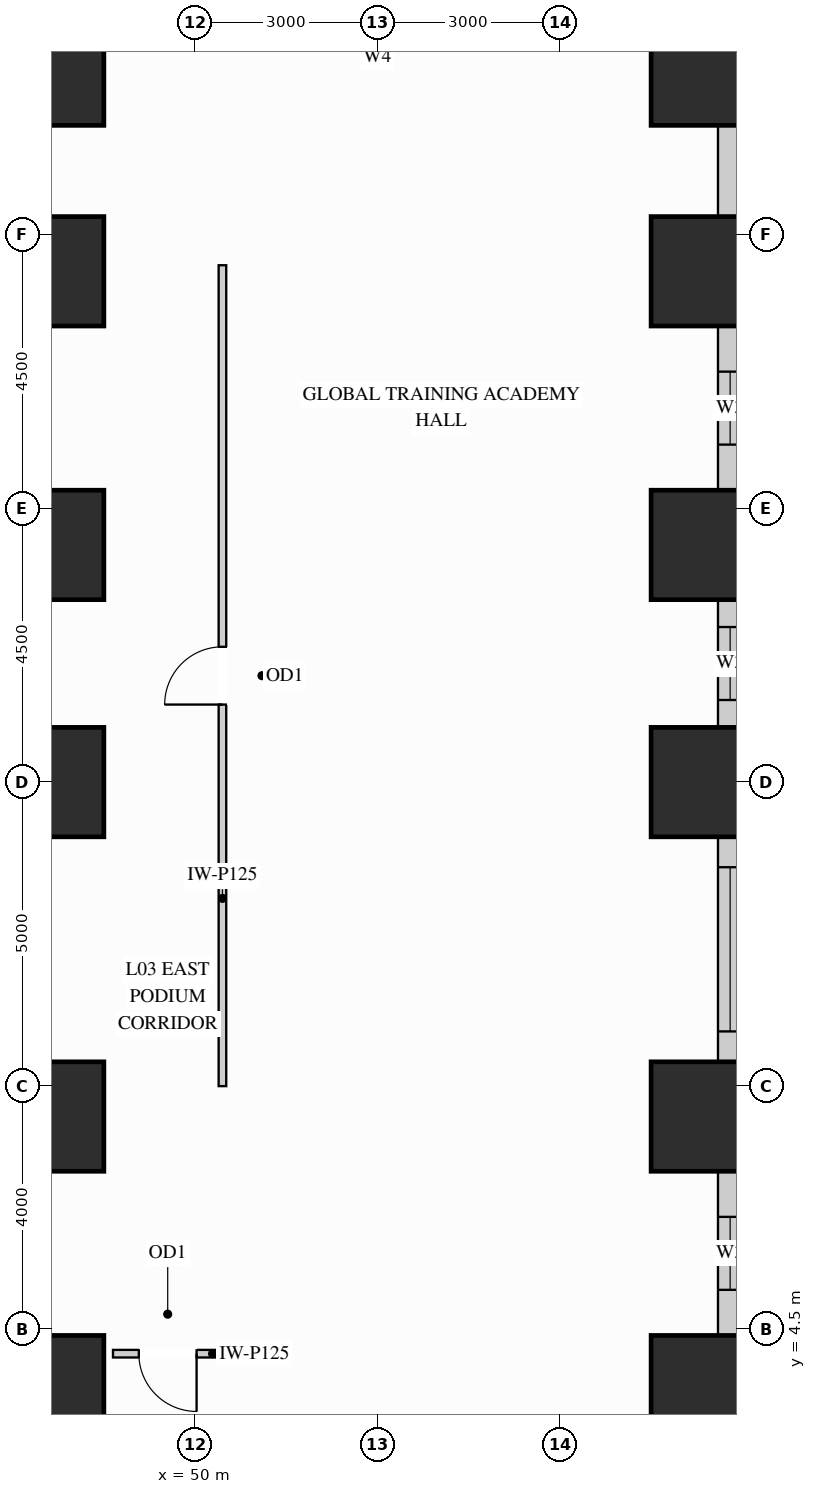
"""IFC4 building model, lengths in metres.
Left out: names, types, materials, properties, quantities, classifications, styles, units other than length and angle.
Written with IfcOpenShell. Run it as: python <this file> out.ifc"""

import sys

from ifc_helpers import new_model, si_unit, direction, frame, frame_2d, origin, origin_2d, place, context, subcontext, project, spatial, rectangle, extrude, source, transform, mapped, element, fill, save


model = new_model("IFC4")
c1 = context("Model", 3, precision=1e-05, world=origin(), true_north=direction((0.0, 1.0)))
c2 = subcontext(c1, "Body", "Model", "MODEL_VIEW")
j1 = project(units=[si_unit("LENGTHUNIT", "METRE"), si_unit("PLANEANGLEUNIT", "RADIAN")], contexts=[c1])
p1 = place(None, origin())
s1 = spatial("IfcSite", under=j1, at=p1, CompositionType="ELEMENT")
p2 = place(p1, origin())
s2 = spatial("IfcBuilding", under=s1, at=p2, CompositionType="ELEMENT")
p3 = place(p2, frame((0.0, 0.0, 13.5)))
s3 = spatial("IfcBuildingStorey", under=s2, at=p3, CompositionType="ELEMENT", Elevation=13.5)
m1 = source(origin(), c2, "Body", "SweptSolid", [
    extrude(rectangle(XDim=1.8, YDim=1.8, at=origin_2d()), origin(), (0.0, 0.0, 1.0), 4.15),
])
for number, where, z_axis, x_axis in (
    (1, (58.4, 3.5, 0.0), (0.0, 0.0, 1.0), (1.0, 0.0, 0.0)),
    (2, (58.4, 8.0, 0.0), (0.0, 0.0, 1.0), (1.0, 0.0, 0.0)),
    (3, (58.4, 13.5, 0.0), (0.0, 0.0, 1.0), (1.0, 0.0, 0.0)),
    (4, (58.4, 17.4, 0.0), (0.0, 0.0, 1.0), (1.0, 0.0, 0.0)),
    (5, (58.4, 21.9, 0.0), (0.0, 0.0, 1.0), (1.0, 0.0, 0.0)),
    (6, (58.4, 25.2, 0.0), (0.0, 0.0, 1.0), (1.0, 0.0, 0.0)),
    (7, (47.6, 3.5, 0.0), (0.0, 0.0, 1.0), (1.0, 0.0, 0.0)),
    (8, (47.6, 8.0, 0.0), (0.0, 0.0, 1.0), (1.0, 0.0, 0.0)),
    (9, (47.6, 13.5, 0.0), (0.0, 0.0, 1.0), (1.0, 0.0, 0.0)),
    (10, (47.6, 17.4, 0.0), (0.0, 0.0, 1.0), (1.0, 0.0, 0.0)),
    (11, (47.6, 21.9, 0.0), (0.0, 0.0, 1.0), (1.0, 0.0, 0.0)),
    (12, (47.6, 25.2, 0.0), (0.0, 0.0, 1.0), (1.0, 0.0, 0.0)),
):
    element("IfcColumn", number, at=place(p3, frame(where, z_axis=z_axis, x_axis=x_axis)), inside=s3, PredefinedType="COLUMN", context=c2, shape_type="MappedRepresentation", body=[
        mapped(m1, transform((0.0, 0.0, 0.0), x_axis=(1.0, 0.0, 0.0), y_axis=(0.0, 1.0, 0.0), z_axis=(0.0, 0.0, 1.0))),
    ])
p4 = place(p3, frame((58.8, 4.398, 0.0), z_axis=(0.0, 0.0, 1.0), x_axis=(0.0, 1.0, 0.0)))
e13 = element("IfcWall", 13, at=p4, inside=s3, PredefinedType="SOLIDWALL", context=c2, shape_type="SweptSolid", body=[
    extrude(rectangle(XDim=2.704, YDim=0.4, at=frame_2d((1.352, 0.0))), origin(), (0.0, 0.0, 1.0), 3.035),
])
p5 = place(p4, frame((0.752, 0.0, 0.65)))
e14 = element("IfcOpeningElement", 14, at=p5, cuts=e13, PredefinedType="OPENING", context=c2, shape_type="SweptSolid", body=[
    extrude(rectangle(XDim=1.2, YDim=2.205, at=frame_2d((0.6, 1.103))), frame((0.0, 0.21, 0.0), z_axis=(0.0, -1.0, 0.0), x_axis=(1.0, 0.0, 0.0)), (0.0, 0.0, 1.0), 0.42),
])
p6 = place(p3, frame((58.8, 8.898, 0.0), z_axis=(0.0, 0.0, 1.0), x_axis=(0.0, 1.0, 0.0)))
e15 = element("IfcWall", 15, at=p6, inside=s3, PredefinedType="SOLIDWALL", context=c2, shape_type="SweptSolid", body=[
    extrude(rectangle(XDim=3.704, YDim=0.4, at=frame_2d((1.852, 0.0))), origin(), (0.0, 0.0, 1.0), 3.035),
])
p7 = place(p6, frame((0.502, 0.0, 0.65)))
e16 = element("IfcOpeningElement", 16, at=p7, cuts=e15, PredefinedType="OPENING", context=c2, shape_type="SweptSolid", body=[
    extrude(rectangle(XDim=2.7, YDim=2.205, at=frame_2d((1.35, 1.103))), frame((0.0, 0.21, 0.0), z_axis=(0.0, -1.0, 0.0), x_axis=(1.0, 0.0, 0.0)), (0.0, 0.0, 1.0), 0.42),
])
p8 = place(p3, frame((58.8, 14.398, 0.0), z_axis=(0.0, 0.0, 1.0), x_axis=(0.0, 1.0, 0.0)))
e17 = element("IfcWall", 17, at=p8, inside=s3, PredefinedType="SOLIDWALL", context=c2, shape_type="SweptSolid", body=[
    extrude(rectangle(XDim=2.104, YDim=0.4, at=frame_2d((1.052, 0.0))), origin(), (0.0, 0.0, 1.0), 3.035),
])
p9 = place(p8, frame((0.452, 0.0, 0.65)))
e18 = element("IfcOpeningElement", 18, at=p9, cuts=e17, PredefinedType="OPENING", context=c2, shape_type="SweptSolid", body=[
    extrude(rectangle(XDim=1.2, YDim=2.205, at=frame_2d((0.6, 1.103))), frame((0.0, 0.21, 0.0), z_axis=(0.0, -1.0, 0.0), x_axis=(1.0, 0.0, 0.0)), (0.0, 0.0, 1.0), 0.42),
])
p10 = place(p3, frame((58.8, 18.298, 0.0), z_axis=(0.0, 0.0, 1.0), x_axis=(0.0, 1.0, 0.0)))
e19 = element("IfcWall", 19, at=p10, inside=s3, PredefinedType="SOLIDWALL", context=c2, shape_type="SweptSolid", body=[
    extrude(rectangle(XDim=2.704, YDim=0.4, at=frame_2d((1.352, 0.0))), origin(), (0.0, 0.0, 1.0), 3.035),
])
p11 = place(p10, frame((0.752, 0.0, 0.65)))
e20 = element("IfcOpeningElement", 20, at=p11, cuts=e19, PredefinedType="OPENING", context=c2, shape_type="SweptSolid", body=[
    extrude(rectangle(XDim=1.2, YDim=2.205, at=frame_2d((0.6, 1.103))), frame((0.0, 0.21, 0.0), z_axis=(0.0, -1.0, 0.0), x_axis=(1.0, 0.0, 0.0)), (0.0, 0.0, 1.0), 0.42),
])
m2 = source(origin(), c2, "Body", "SweptSolid", [
    extrude(rectangle(XDim=1.504, YDim=0.4, at=frame_2d((0.752, 0.0))), origin(), (0.0, 0.0, 1.0), 3.035),
])
p12 = place(p3, frame((58.8, 22.798, 0.0), z_axis=(0.0, 0.0, 1.0), x_axis=(0.0, 1.0, 0.0)))
e21 = element("IfcWall", 21, at=p12, inside=s3, PredefinedType="SOLIDWALL", context=c2, shape_type="MappedRepresentation", body=[
    mapped(m2, transform((0.0, 0.0, 0.0), x_axis=(1.0, 0.0, 0.0), y_axis=(0.0, 1.0, 0.0), z_axis=(0.0, 0.0, 1.0))),
])
p13 = place(p3, frame((50.45, 8.5, 0.0), z_axis=(0.0, 0.0, 1.0), x_axis=(0.0, 1.0, 0.0)))
e22 = element("IfcWall", 22, at=p13, inside=s3, PredefinedType="PARTITIONING", context=c2, shape_type="SweptSolid", body=[
    extrude(rectangle(XDim=13.5, YDim=0.125, at=frame_2d((6.75, 0.0))), origin(), (0.0, 0.0, 1.0), 4.135),
])
p14 = place(p13, frame((6.275, 0.0, 0.0)))
e23 = element("IfcOpeningElement", 23, at=p14, cuts=e22, PredefinedType="OPENING", context=c2, shape_type="SweptSolid", body=[
    extrude(rectangle(XDim=0.95, YDim=2.15, at=frame_2d((0.475, 1.075))), frame((0.0, 0.073, 0.0), z_axis=(0.0, -1.0, 0.0), x_axis=(1.0, 0.0, 0.0)), (0.0, 0.0, 1.0), 0.145),
])
p15 = place(p3, frame((48.65, 4.1, 0.0), z_axis=(0.0, 0.0, 1.0), x_axis=(1.0, 0.0, 0.0)))
e24 = element("IfcWall", 24, at=p15, inside=s3, PredefinedType="PARTITIONING", context=c2, shape_type="SweptSolid", body=[
    extrude(rectangle(XDim=1.8, YDim=0.125, at=frame_2d((0.9, 0.0))), origin(), (0.0, 0.0, 1.0), 3.586),
])
p16 = place(p15, frame((0.425, 0.0, 0.0)))
e25 = element("IfcOpeningElement", 25, at=p16, cuts=e24, PredefinedType="OPENING", context=c2, shape_type="SweptSolid", body=[
    extrude(rectangle(XDim=0.95, YDim=2.15, at=frame_2d((0.475, 1.075))), frame((0.0, 0.073, 0.0), z_axis=(0.0, -1.0, 0.0), x_axis=(1.0, 0.0, 0.0)), (0.0, 0.0, 1.0), 0.145),
])
m3 = source(origin(), c2, "Body", "SweptSolid", [
    extrude(rectangle(XDim=0.95, YDim=2.15, at=frame_2d((0.475, 1.075))), frame((0.0, 0.025, 0.0), z_axis=(0.0, -1.0, 0.0), x_axis=(1.0, 0.0, 0.0)), (0.0, 0.0, 1.0), 0.05),
])
p17 = place(p14, origin())
e26 = element("IfcDoor", 26, at=p17, inside=s3, OperationType="SINGLE_SWING_LEFT", PredefinedType="DOOR", context=c2, shape_type="MappedRepresentation", body=[
    mapped(m3, transform((0.0, 0.0, 0.0), x_axis=(1.0, 0.0, 0.0), y_axis=(0.0, 1.0, 0.0), z_axis=(0.0, 0.0, 1.0))),
])
fill(e23, e26)
p18 = place(p16, origin())
e27 = element("IfcDoor", 27, at=p18, inside=s3, OperationType="SINGLE_SWING_RIGHT", PredefinedType="DOOR", context=c2, shape_type="MappedRepresentation", body=[
    mapped(m3, transform((0.0, 0.0, 0.0), x_axis=(1.0, 0.0, 0.0), y_axis=(0.0, 1.0, 0.0), z_axis=(0.0, 0.0, 1.0))),
])
fill(e25, e27)
m4 = source(origin(), c2, "Body", "SweptSolid", [
    extrude(rectangle(XDim=1.2, YDim=2.205, at=frame_2d((0.6, 1.103))), frame((0.0, 0.03, 0.0), z_axis=(0.0, -1.0, 0.0), x_axis=(1.0, 0.0, 0.0)), (0.0, 0.0, 1.0), 0.06),
])
p19 = place(p5, origin())
e28 = element("IfcWindow", 28, at=p19, inside=s3, PartitioningType="SINGLE_PANEL", PredefinedType="WINDOW", context=c2, shape_type="MappedRepresentation", body=[
    mapped(m4, transform((0.0, 0.0, 0.0), x_axis=(1.0, 0.0, 0.0), y_axis=(0.0, 1.0, 0.0), z_axis=(0.0, 0.0, 1.0))),
])
fill(e14, e28)
p20 = place(p9, origin())
e29 = element("IfcWindow", 29, at=p20, inside=s3, PartitioningType="SINGLE_PANEL", PredefinedType="WINDOW", context=c2, shape_type="MappedRepresentation", body=[
    mapped(m4, transform((0.0, 0.0, 0.0), x_axis=(1.0, 0.0, 0.0), y_axis=(0.0, 1.0, 0.0), z_axis=(0.0, 0.0, 1.0))),
])
fill(e18, e29)
p21 = place(p11, origin())
e30 = element("IfcWindow", 30, at=p21, inside=s3, PartitioningType="SINGLE_PANEL", PredefinedType="WINDOW", context=c2, shape_type="MappedRepresentation", body=[
    mapped(m4, transform((0.0, 0.0, 0.0), x_axis=(1.0, 0.0, 0.0), y_axis=(0.0, 1.0, 0.0), z_axis=(0.0, 0.0, 1.0))),
])
fill(e20, e30)
m5 = source(origin(), c2, "Body", "SweptSolid", [
    extrude(rectangle(XDim=2.7, YDim=2.205, at=frame_2d((1.35, 1.103))), frame((0.0, 0.03, 0.0), z_axis=(0.0, -1.0, 0.0), x_axis=(1.0, 0.0, 0.0)), (0.0, 0.0, 1.0), 0.06),
])
p22 = place(p7, origin())
e31 = element("IfcWindow", 31, at=p22, inside=s3, PartitioningType="SINGLE_PANEL", PredefinedType="WINDOW", context=c2, shape_type="MappedRepresentation", body=[
    mapped(m5, transform((0.0, 0.0, 0.0), x_axis=(1.0, 0.0, 0.0), y_axis=(0.0, 1.0, 0.0), z_axis=(0.0, 0.0, 1.0))),
])
fill(e16, e31)
save(model, sys.argv[1])
